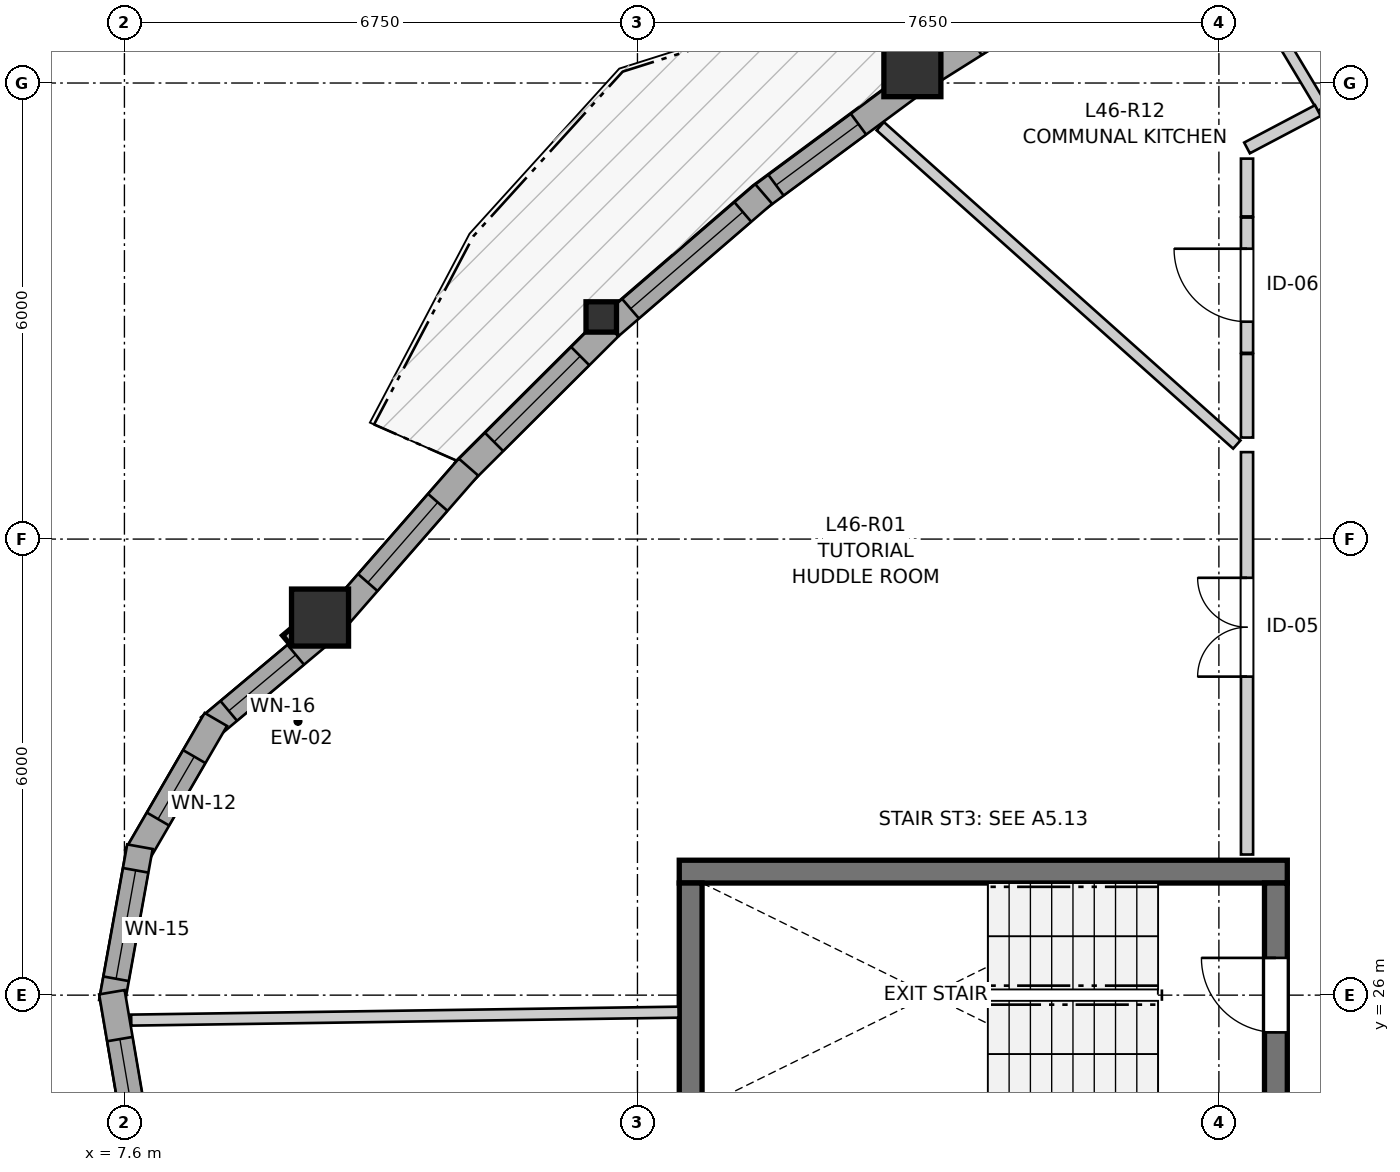
"""IFC4 building model, lengths in metres.
Left out: names, types, materials, properties, quantities, classifications, styles, units other than length and angle.
Written with IfcOpenShell. Run it as: python <this file> out.ifc"""

import sys

from ifc_helpers import new_model, si_unit, direction, frame, frame_2d, origin, origin_2d, place, context, subcontext, project, spatial, rectangle, i_section, extrude, source, transform, mapped, element, fill, save


model = new_model("IFC4")
c1 = context("Model", 3, precision=1e-05, world=origin(), true_north=direction((0.0, 1.0)))
c2 = subcontext(c1, "Body", "Model", "MODEL_VIEW")
j1 = project(units=[si_unit("LENGTHUNIT", "METRE"), si_unit("PLANEANGLEUNIT", "RADIAN")], contexts=[c1])
p1 = place(None, origin())
s1 = spatial("IfcSite", under=j1, at=p1, CompositionType="ELEMENT")
p2 = place(p1, origin())
s2 = spatial("IfcBuilding", under=s1, at=p2, CompositionType="ELEMENT")
p3 = place(p2, frame((0.0, 0.0, 155.4)))
s3 = spatial("IfcBuildingStorey", under=s2, at=p3, CompositionType="ELEMENT", Elevation=155.4)
p4 = place(p3, frame((22.9, 27.625, 0.0), z_axis=(0.0, 0.0, 1.0), x_axis=(-1.0, 0.0, 0.0)))
e1 = element("IfcWall", 1, at=p4, inside=s3, PredefinedType="SHEAR", context=c2, shape_type="SweptSolid", body=[
    extrude(rectangle(XDim=8.0, YDim=0.3, at=frame_2d((4.0, 0.0))), origin(), (0.0, 0.0, 1.0), 2.935),
])
p5 = place(p3, frame((15.05, 27.475, 0.0), z_axis=(0.0, 0.0, 1.0), x_axis=(0.0, -1.0, 0.0)))
e2 = element("IfcWall", 2, at=p5, inside=s3, PredefinedType="SHEAR", context=c2, shape_type="SweptSolid", body=[
    extrude(rectangle(XDim=2.95, YDim=0.3, at=frame_2d((1.475, 0.0))), origin(), (0.0, 0.0, 1.0), 2.935),
])
p6 = place(p3, frame((22.75, 24.525, 0.0), z_axis=(0.0, 0.0, 1.0), x_axis=(0.0, 1.0, 0.0)))
e3 = element("IfcWall", 3, at=p6, inside=s3, PredefinedType="SHEAR", context=c2, shape_type="SweptSolid", body=[
    extrude(rectangle(XDim=2.95, YDim=0.3, at=frame_2d((1.475, 0.0))), origin(), (0.0, 0.0, 1.0), 2.935),
])
p7 = place(p6, frame((0.985, 0.0, 0.0)))
e4 = element("IfcOpeningElement", 4, at=p7, cuts=e3, PredefinedType="OPENING", context=c2, shape_type="SweptSolid", body=[
    extrude(rectangle(XDim=0.98, YDim=2.15, at=frame_2d((0.49, 1.075))), frame((0.0, 0.16, 0.0), z_axis=(0.0, -1.0, 0.0), x_axis=(1.0, 0.0, 0.0)), (0.0, 0.0, 1.0), 0.32),
])
m1 = source(origin(), c2, "Body", "SweptSolid", [
    extrude(rectangle(XDim=0.75, YDim=0.75, at=origin_2d()), origin(), (0.0, 0.0, 1.0), 2.935),
])
for number, where, z_axis, x_axis in (
    (5, (10.174, 30.967, 0.0), (0.0, 0.0, 1.0), (1.0, 0.0, 0.0)),
    (6, (17.967, 38.195, 0.0), (0.0, 0.0, 1.0), (1.0, 0.0, 0.0)),
):
    element("IfcColumn", number, at=place(p3, frame(where, z_axis=z_axis, x_axis=x_axis)), inside=s3, PredefinedType="COLUMN", context=c2, shape_type="MappedRepresentation", body=[
        mapped(m1, transform((0.0, 0.0, 0.0), x_axis=(1.0, 0.0, 0.0), y_axis=(0.0, 1.0, 0.0), z_axis=(0.0, 0.0, 1.0), scale=1.0)),
    ])
m2 = source(origin(), c2, "Body", "SweptSolid", [
    extrude(i_section(OverallWidth=0.401, OverallDepth=0.399, WebThickness=0.023, FlangeThickness=0.036, FilletRadius=0.015, at=origin_2d()), origin(), (0.0, 0.0, 1.0), 2.935),
])
p8 = place(p3, frame((13.874, 34.922, 0.0), z_axis=(0.0, 0.0, 1.0), x_axis=(1.0, 0.0, 0.0)))
e7 = element("IfcColumn", 7, at=p8, inside=s3, PredefinedType="PILASTER", context=c2, shape_type="MappedRepresentation", body=[
    mapped(m2, transform((0.0, 0.0, 0.0), x_axis=(1.0, 0.0, 0.0), y_axis=(0.0, 1.0, 0.0), z_axis=(0.0, 0.0, 1.0), scale=1.0)),
])
p9 = place(p3, frame((10.164, 30.738, 0.0), z_axis=(0.0, 0.0, 1.0), x_axis=(-0.766501557267, -0.64224244854, 0.0)))
e8 = element("IfcWall", 8, at=p9, inside=s3, PredefinedType="SOLIDWALL", context=c2, shape_type="SweptSolid", body=[
    extrude(rectangle(XDim=1.888, YDim=0.34, at=frame_2d((0.944, 0.0))), origin(), (0.0, 0.0, 1.0), 2.515),
])
p10 = place(p9, frame((0.404, 0.0, 0.82)))
e9 = element("IfcOpeningElement", 9, at=p10, cuts=e8, PredefinedType="OPENING", context=c2, shape_type="SweptSolid", body=[
    extrude(rectangle(XDim=1.15, YDim=1.2, at=frame_2d((0.575, 0.6))), frame((0.0, 0.18, 0.0), z_axis=(0.0, -1.0, 0.0), x_axis=(1.0, 0.0, 0.0)), (0.0, 0.0, 1.0), 0.36),
])
p11 = place(p3, frame((8.803, 29.627, 0.0), z_axis=(0.0, 0.0, 1.0), x_axis=(-0.502090235641, -0.864815237651, 0.0)))
e10 = element("IfcWall", 10, at=p11, inside=s3, PredefinedType="SOLIDWALL", context=c2, shape_type="SweptSolid", body=[
    extrude(rectangle(XDim=2.081, YDim=0.34, at=frame_2d((1.041, 0.0))), origin(), (0.0, 0.0, 1.0), 2.515),
])
p12 = place(p11, frame((0.565, 0.0, 0.82)))
e11 = element("IfcOpeningElement", 11, at=p12, cuts=e10, PredefinedType="OPENING", context=c2, shape_type="SweptSolid", body=[
    extrude(rectangle(XDim=0.95, YDim=1.35, at=frame_2d((0.475, 0.675))), frame((0.0, 0.18, 0.0), z_axis=(0.0, -1.0, 0.0), x_axis=(1.0, 0.0, 0.0)), (0.0, 0.0, 1.0), 0.36),
])
p13 = place(p3, frame((7.804, 27.953, 0.0), z_axis=(0.0, 0.0, 1.0), x_axis=(-0.177605215389, -0.984101817632, 0.0)))
e12 = element("IfcWall", 12, at=p13, inside=s3, PredefinedType="SOLIDWALL", context=c2, shape_type="SweptSolid", body=[
    extrude(rectangle(XDim=2.081, YDim=0.34, at=frame_2d((1.041, 0.0))), origin(), (0.0, 0.0, 1.0), 2.515),
])
p14 = place(p13, frame((0.316, 0.0, 0.82)))
e13 = element("IfcOpeningElement", 13, at=p14, cuts=e12, PredefinedType="OPENING", context=c2, shape_type="SweptSolid", body=[
    extrude(rectangle(XDim=1.45, YDim=1.25, at=frame_2d((0.725, 0.625))), frame((0.0, 0.18, 0.0), z_axis=(0.0, -1.0, 0.0), x_axis=(1.0, 0.0, 0.0)), (0.0, 0.0, 1.0), 0.36),
])
p15 = place(p3, frame((7.435, 26.038, 0.0), z_axis=(0.0, 0.0, 1.0), x_axis=(0.168107405166, -0.985768685001, 0.0)))
e14 = element("IfcWall", 14, at=p15, inside=s3, PredefinedType="SOLIDWALL", context=c2, shape_type="SweptSolid", body=[
    extrude(rectangle(XDim=2.081, YDim=0.34, at=frame_2d((1.041, 0.0))), origin(), (0.0, 0.0, 1.0), 2.515),
])
p16 = place(p15, frame((0.625, 0.0, 0.82)))
e15 = element("IfcOpeningElement", 15, at=p16, cuts=e14, PredefinedType="OPENING", context=c2, shape_type="SweptSolid", body=[
    extrude(rectangle(XDim=1.15, YDim=1.2, at=frame_2d((0.575, 0.6))), frame((0.0, 0.18, 0.0), z_axis=(0.0, -1.0, 0.0), x_axis=(1.0, 0.0, 0.0)), (0.0, 0.0, 1.0), 0.36),
])
p17 = place(p3, frame((20.284, 39.452, 0.0), z_axis=(0.0, 0.0, 1.0), x_axis=(-0.846415587119, -0.532522913951, 0.0)))
e16 = element("IfcWall", 16, at=p17, inside=s3, PredefinedType="SOLIDWALL", context=c2, shape_type="SweptSolid", body=[
    extrude(rectangle(XDim=2.476, YDim=0.34, at=frame_2d((1.238, 0.0))), origin(), (0.0, 0.0, 1.0), 2.515),
])
p18 = place(p17, frame((0.718, 0.0, 0.82)))
e17 = element("IfcOpeningElement", 17, at=p18, cuts=e16, PredefinedType="OPENING", context=c2, shape_type="SweptSolid", body=[
    extrude(rectangle(XDim=1.05, YDim=1.45, at=frame_2d((0.525, 0.725))), frame((0.0, 0.18, 0.0), z_axis=(0.0, -1.0, 0.0), x_axis=(1.0, 0.0, 0.0)), (0.0, 0.0, 1.0), 0.36),
])
p19 = place(p3, frame((17.944, 37.967, 0.0), z_axis=(0.0, 0.0, 1.0), x_axis=(-0.803795025682, -0.594906342788, 0.0)))
e18 = element("IfcWall", 18, at=p19, inside=s3, PredefinedType="SOLIDWALL", context=c2, shape_type="SweptSolid", body=[
    extrude(rectangle(XDim=2.491, YDim=0.34, at=frame_2d((1.245, 0.0))), origin(), (0.0, 0.0, 1.0), 2.515),
])
p20 = place(p19, frame((0.853, 0.0, 0.82)))
e19 = element("IfcOpeningElement", 19, at=p20, cuts=e18, PredefinedType="OPENING", context=c2, shape_type="SweptSolid", body=[
    extrude(rectangle(XDim=1.35, YDim=1.45, at=frame_2d((0.675, 0.725))), frame((0.0, 0.18, 0.0), z_axis=(0.0, -1.0, 0.0), x_axis=(1.0, 0.0, 0.0)), (0.0, 0.0, 1.0), 0.36),
])
p21 = place(p3, frame((16.011, 36.54, 0.0), z_axis=(0.0, 0.0, 1.0), x_axis=(-0.757442887734, -0.652901425807, 0.0)))
e20 = element("IfcWall", 20, at=p21, inside=s3, PredefinedType="SOLIDWALL", context=c2, shape_type="SweptSolid", body=[
    extrude(rectangle(XDim=2.655, YDim=0.34, at=frame_2d((1.328, 0.0))), origin(), (0.0, 0.0, 1.0), 2.515),
])
p22 = place(p21, frame((0.363, 0.0, 0.82)))
e21 = element("IfcOpeningElement", 21, at=p22, cuts=e20, PredefinedType="OPENING", context=c2, shape_type="SweptSolid", body=[
    extrude(rectangle(XDim=1.95, YDim=1.4, at=frame_2d((0.975, 0.7))), frame((0.0, 0.18, 0.0), z_axis=(0.0, -1.0, 0.0), x_axis=(1.0, 0.0, 0.0)), (0.0, 0.0, 1.0), 0.36),
])
p23 = place(p3, frame((13.979, 34.788, 0.0), z_axis=(0.0, 0.0, 1.0), x_axis=(-0.708417113386, -0.705794016312, 0.0)))
e22 = element("IfcWall", 22, at=p23, inside=s3, PredefinedType="SOLIDWALL", context=c2, shape_type="SweptSolid", body=[
    extrude(rectangle(XDim=2.699, YDim=0.34, at=frame_2d((1.35, 0.0))), origin(), (0.0, 0.0, 1.0), 2.515),
])
p24 = place(p23, frame((0.54, 0.0, 0.82)))
e23 = element("IfcOpeningElement", 23, at=p24, cuts=e22, PredefinedType="OPENING", context=c2, shape_type="SweptSolid", body=[
    extrude(rectangle(XDim=1.6, YDim=1.35, at=frame_2d((0.8, 0.675))), frame((0.0, 0.18, 0.0), z_axis=(0.0, -1.0, 0.0), x_axis=(1.0, 0.0, 0.0)), (0.0, 0.0, 1.0), 0.36),
])
p25 = place(p3, frame((12.127, 32.947, 0.0), z_axis=(0.0, 0.0, 1.0), x_axis=(-0.657607305641, -0.753360890655, 0.0)))
e24 = element("IfcWall", 24, at=p25, inside=s3, PredefinedType="SOLIDWALL", context=c2, shape_type="SweptSolid", body=[
    extrude(rectangle(XDim=2.621, YDim=0.34, at=frame_2d((1.311, 0.0))), origin(), (0.0, 0.0, 1.0), 2.515),
])
p26 = place(p25, frame((0.615, 0.0, 0.82)))
e25 = element("IfcOpeningElement", 25, at=p26, cuts=e24, PredefinedType="OPENING", context=c2, shape_type="SweptSolid", body=[
    extrude(rectangle(XDim=1.4, YDim=1.35, at=frame_2d((0.7, 0.675))), frame((0.0, 0.18, 0.0), z_axis=(0.0, -1.0, 0.0), x_axis=(1.0, 0.0, 0.0)), (0.0, 0.0, 1.0), 0.36),
])
p27 = place(p3, frame((22.37, 27.85, 0.0), z_axis=(0.0, 0.0, 1.0), x_axis=(0.0, 1.0, 0.0)))
e26 = element("IfcWall", 26, at=p27, inside=s3, PredefinedType="PARTITIONING", context=c2, shape_type="SweptSolid", body=[
    extrude(rectangle(XDim=5.294, YDim=0.16, at=frame_2d((2.647, 0.0))), origin(), (0.0, 0.0, 1.0), 2.935),
])
p28 = place(p27, frame((2.341, 0.0, 0.0)))
e27 = element("IfcOpeningElement", 27, at=p28, cuts=e26, PredefinedType="OPENING", context=c2, shape_type="SweptSolid", body=[
    extrude(rectangle(XDim=1.3, YDim=2.1, at=frame_2d((0.65, 1.05))), frame((0.0, 0.09, 0.0), z_axis=(0.0, -1.0, 0.0), x_axis=(1.0, 0.0, 0.0)), (0.0, 0.0, 1.0), 0.18),
])
p29 = place(p3, frame((22.37, 34.45, 0.0), z_axis=(0.0, 0.0, 1.0), x_axis=(0.0, 1.0, 0.0)))
e28 = element("IfcWall", 28, at=p29, inside=s3, PredefinedType="PARTITIONING", context=c2, shape_type="SweptSolid", body=[
    extrude(rectangle(XDim=1.78, YDim=0.16, at=frame_2d((0.89, 0.0))), origin(), (0.0, 0.0, 1.0), 2.935),
])
p30 = place(p29, frame((0.41, 0.0, 0.0)))
e29 = element("IfcOpeningElement", 29, at=p30, cuts=e28, PredefinedType="OPENING", context=c2, shape_type="SweptSolid", body=[
    extrude(rectangle(XDim=0.96, YDim=2.1, at=frame_2d((0.48, 1.05))), frame((0.0, 0.09, 0.0), z_axis=(0.0, -1.0, 0.0), x_axis=(1.0, 0.0, 0.0)), (0.0, 0.0, 1.0), 0.18),
])
p31 = place(p3, frame((7.689, 25.671, 0.0), z_axis=(0.0, 0.0, 1.0), x_axis=(0.999894747293, 0.014508422953, 0.0)))
e30 = element("IfcWall", 30, at=p31, inside=s3, PredefinedType="PARTITIONING", context=c2, shape_type="SweptSolid", body=[
    extrude(rectangle(XDim=7.202, YDim=0.145, at=frame_2d((3.601, 0.0))), origin(), (0.0, 0.0, 1.0), 2.935),
])
p32 = place(p3, frame((17.545, 37.432, 0.0), z_axis=(0.0, 0.0, 1.0), x_axis=(0.745965905636, -0.665984134668, 0.0)))
e31 = element("IfcWall", 31, at=p32, inside=s3, PredefinedType="PARTITIONING", context=c2, shape_type="SweptSolid", body=[
    extrude(rectangle(XDim=6.288, YDim=0.145, at=frame_2d((3.144, 0.0))), origin(), (0.0, 0.0, 1.0), 2.935),
])
p33 = place(p3, frame((21.908, 40.1, 0.0), z_axis=(0.0, 0.0, 1.0), x_axis=(0.513582752497, -0.85804006686, 0.0)))
e32 = element("IfcWall", 32, at=p33, inside=s3, PredefinedType="PARTITIONING", context=c2, shape_type="SweptSolid", body=[
    extrude(rectangle(XDim=2.832, YDim=0.145, at=frame_2d((1.416, 0.0))), origin(), (0.0, 0.0, 1.0), 2.935),
])
p34 = place(p3, frame((22.37, 33.336, 0.0), z_axis=(0.0, 0.0, 1.0), x_axis=(0.0, 1.0, 0.0)))
e33 = element("IfcWall", 33, at=p34, inside=s3, PredefinedType="PARTITIONING", context=c2, shape_type="SweptSolid", body=[
    extrude(rectangle(XDim=1.099, YDim=0.16, at=frame_2d((0.55, 0.0))), origin(), (0.0, 0.0, 1.0), 2.935),
])
p35 = place(p3, frame((22.37, 37.146, 0.0), z_axis=(0.0, 0.0, 1.0), x_axis=(0.884530854714, 0.46648168995, 0.0)))
e34 = element("IfcWall", 34, at=p35, inside=s3, PredefinedType="PARTITIONING", context=c2, shape_type="SweptSolid", body=[
    extrude(rectangle(XDim=1.053, YDim=0.16, at=frame_2d((0.527, 0.0))), origin(), (0.0, 0.0, 1.0), 2.543),
])
p36 = place(p3, frame((22.37, 36.245, 0.0), z_axis=(0.0, 0.0, 1.0), x_axis=(0.0, 1.0, 0.0)))
e35 = element("IfcWall", 35, at=p36, inside=s3, PredefinedType="PARTITIONING", context=c2, shape_type="SweptSolid", body=[
    extrude(rectangle(XDim=0.76, YDim=0.16, at=frame_2d((0.38, 0.0))), origin(), (0.0, 0.0, 1.0), 2.935),
])
m3 = source(origin(), c2, "Body", "SweptSolid", [
    extrude(rectangle(XDim=1.15, YDim=1.2, at=frame_2d((0.575, 0.6))), frame((0.0, 0.03, 0.0), z_axis=(0.0, -1.0, 0.0), x_axis=(1.0, 0.0, 0.0)), (0.0, 0.0, 1.0), 0.06),
])
p37 = place(p10, origin())
e36 = element("IfcWindow", 36, at=p37, inside=s3, PartitioningType="SINGLE_PANEL", PredefinedType="WINDOW", context=c2, shape_type="MappedRepresentation", body=[
    mapped(m3, transform((0.0, 0.0, 0.0), x_axis=(1.0, 0.0, 0.0), y_axis=(0.0, 1.0, 0.0), z_axis=(0.0, 0.0, 1.0), scale=1.0)),
])
fill(e9, e36)
m4 = source(origin(), c2, "Body", "SweptSolid", [
    extrude(rectangle(XDim=0.95, YDim=1.35, at=frame_2d((0.475, 0.675))), frame((0.0, 0.03, 0.0), z_axis=(0.0, -1.0, 0.0), x_axis=(1.0, 0.0, 0.0)), (0.0, 0.0, 1.0), 0.06),
])
p38 = place(p12, origin())
e37 = element("IfcWindow", 37, at=p38, inside=s3, PartitioningType="SINGLE_PANEL", PredefinedType="WINDOW", context=c2, shape_type="MappedRepresentation", body=[
    mapped(m4, transform((0.0, 0.0, 0.0), x_axis=(1.0, 0.0, 0.0), y_axis=(0.0, 1.0, 0.0), z_axis=(0.0, 0.0, 1.0), scale=1.0)),
])
fill(e11, e37)
m5 = source(origin(), c2, "Body", "SweptSolid", [
    extrude(rectangle(XDim=1.45, YDim=1.25, at=frame_2d((0.725, 0.625))), frame((0.0, 0.03, 0.0), z_axis=(0.0, -1.0, 0.0), x_axis=(1.0, 0.0, 0.0)), (0.0, 0.0, 1.0), 0.06),
])
p39 = place(p14, origin())
e38 = element("IfcWindow", 38, at=p39, inside=s3, PartitioningType="SINGLE_PANEL", PredefinedType="WINDOW", context=c2, shape_type="MappedRepresentation", body=[
    mapped(m5, transform((0.0, 0.0, 0.0), x_axis=(1.0, 0.0, 0.0), y_axis=(0.0, 1.0, 0.0), z_axis=(0.0, 0.0, 1.0), scale=1.0)),
])
fill(e13, e38)
p40 = place(p16, origin())
e39 = element("IfcWindow", 39, at=p40, inside=s3, PartitioningType="SINGLE_PANEL", PredefinedType="WINDOW", context=c2, shape_type="MappedRepresentation", body=[
    mapped(m3, transform((0.0, 0.0, 0.0), x_axis=(1.0, 0.0, 0.0), y_axis=(0.0, 1.0, 0.0), z_axis=(0.0, 0.0, 1.0), scale=1.0)),
])
fill(e15, e39)
m6 = source(origin(), c2, "Body", "SweptSolid", [
    extrude(rectangle(XDim=1.35, YDim=1.45, at=frame_2d((0.675, 0.725))), frame((0.0, 0.03, 0.0), z_axis=(0.0, -1.0, 0.0), x_axis=(1.0, 0.0, 0.0)), (0.0, 0.0, 1.0), 0.06),
])
p41 = place(p20, origin())
e40 = element("IfcWindow", 40, at=p41, inside=s3, PartitioningType="SINGLE_PANEL", PredefinedType="WINDOW", context=c2, shape_type="MappedRepresentation", body=[
    mapped(m6, transform((0.0, 0.0, 0.0), x_axis=(1.0, 0.0, 0.0), y_axis=(0.0, 1.0, 0.0), z_axis=(0.0, 0.0, 1.0), scale=1.0)),
])
fill(e19, e40)
m7 = source(origin(), c2, "Body", "SweptSolid", [
    extrude(rectangle(XDim=1.95, YDim=1.4, at=frame_2d((0.975, 0.7))), frame((0.0, 0.03, 0.0), z_axis=(0.0, -1.0, 0.0), x_axis=(1.0, 0.0, 0.0)), (0.0, 0.0, 1.0), 0.06),
])
p42 = place(p22, origin())
e41 = element("IfcWindow", 41, at=p42, inside=s3, PartitioningType="SINGLE_PANEL", PredefinedType="WINDOW", context=c2, shape_type="MappedRepresentation", body=[
    mapped(m7, transform((0.0, 0.0, 0.0), x_axis=(1.0, 0.0, 0.0), y_axis=(0.0, 1.0, 0.0), z_axis=(0.0, 0.0, 1.0), scale=1.0)),
])
fill(e21, e41)
m8 = source(origin(), c2, "Body", "SweptSolid", [
    extrude(rectangle(XDim=1.6, YDim=1.35, at=frame_2d((0.8, 0.675))), frame((0.0, 0.03, 0.0), z_axis=(0.0, -1.0, 0.0), x_axis=(1.0, 0.0, 0.0)), (0.0, 0.0, 1.0), 0.06),
])
p43 = place(p24, origin())
e42 = element("IfcWindow", 42, at=p43, inside=s3, PartitioningType="SINGLE_PANEL", PredefinedType="WINDOW", context=c2, shape_type="MappedRepresentation", body=[
    mapped(m8, transform((0.0, 0.0, 0.0), x_axis=(1.0, 0.0, 0.0), y_axis=(0.0, 1.0, 0.0), z_axis=(0.0, 0.0, 1.0), scale=1.0)),
])
fill(e23, e42)
m9 = source(origin(), c2, "Body", "SweptSolid", [
    extrude(rectangle(XDim=1.4, YDim=1.35, at=frame_2d((0.7, 0.675))), frame((0.0, 0.03, 0.0), z_axis=(0.0, -1.0, 0.0), x_axis=(1.0, 0.0, 0.0)), (0.0, 0.0, 1.0), 0.06),
])
p44 = place(p26, origin())
e43 = element("IfcWindow", 43, at=p44, inside=s3, PartitioningType="SINGLE_PANEL", PredefinedType="WINDOW", context=c2, shape_type="MappedRepresentation", body=[
    mapped(m9, transform((0.0, 0.0, 0.0), x_axis=(1.0, 0.0, 0.0), y_axis=(0.0, 1.0, 0.0), z_axis=(0.0, 0.0, 1.0), scale=1.0)),
])
fill(e25, e43)
m10 = source(origin(), c2, "Body", "SweptSolid", [
    extrude(rectangle(XDim=0.98, YDim=2.15, at=frame_2d((0.49, 1.075))), frame((0.0, 0.025, 0.0), z_axis=(0.0, -1.0, 0.0), x_axis=(1.0, 0.0, 0.0)), (0.0, 0.0, 1.0), 0.05),
])
p45 = place(p7, origin())
e44 = element("IfcDoor", 44, at=p45, inside=s3, OperationType="SINGLE_SWING_RIGHT", PredefinedType="DOOR", context=c2, shape_type="MappedRepresentation", body=[
    mapped(m10, transform((0.0, 0.0, 0.0), x_axis=(1.0, 0.0, 0.0), y_axis=(0.0, 1.0, 0.0), z_axis=(0.0, 0.0, 1.0), scale=1.0)),
])
fill(e4, e44)
m11 = source(origin(), c2, "Body", "SweptSolid", [
    extrude(rectangle(XDim=1.3, YDim=2.1, at=frame_2d((0.65, 1.05))), frame((0.0, 0.025, 0.0), z_axis=(0.0, -1.0, 0.0), x_axis=(1.0, 0.0, 0.0)), (0.0, 0.0, 1.0), 0.05),
])
p46 = place(p28, origin())
e45 = element("IfcDoor", 45, at=p46, inside=s3, OperationType="DOUBLE_DOOR_SINGLE_SWING", PredefinedType="DOOR", context=c2, shape_type="MappedRepresentation", body=[
    mapped(m11, transform((0.0, 0.0, 0.0), x_axis=(1.0, 0.0, 0.0), y_axis=(0.0, 1.0, 0.0), z_axis=(0.0, 0.0, 1.0), scale=1.0)),
])
fill(e27, e45)
m12 = source(origin(), c2, "Body", "SweptSolid", [
    extrude(rectangle(XDim=0.96, YDim=2.1, at=frame_2d((0.48, 1.05))), frame((0.0, 0.025, 0.0), z_axis=(0.0, -1.0, 0.0), x_axis=(1.0, 0.0, 0.0)), (0.0, 0.0, 1.0), 0.05),
])
p47 = place(p30, origin())
e46 = element("IfcDoor", 46, at=p47, inside=s3, OperationType="SINGLE_SWING_RIGHT", PredefinedType="DOOR", context=c2, shape_type="MappedRepresentation", body=[
    mapped(m12, transform((0.0, 0.0, 0.0), x_axis=(1.0, 0.0, 0.0), y_axis=(0.0, 1.0, 0.0), z_axis=(0.0, 0.0, 1.0), scale=1.0)),
])
fill(e29, e46)
save(model, sys.argv[1])
